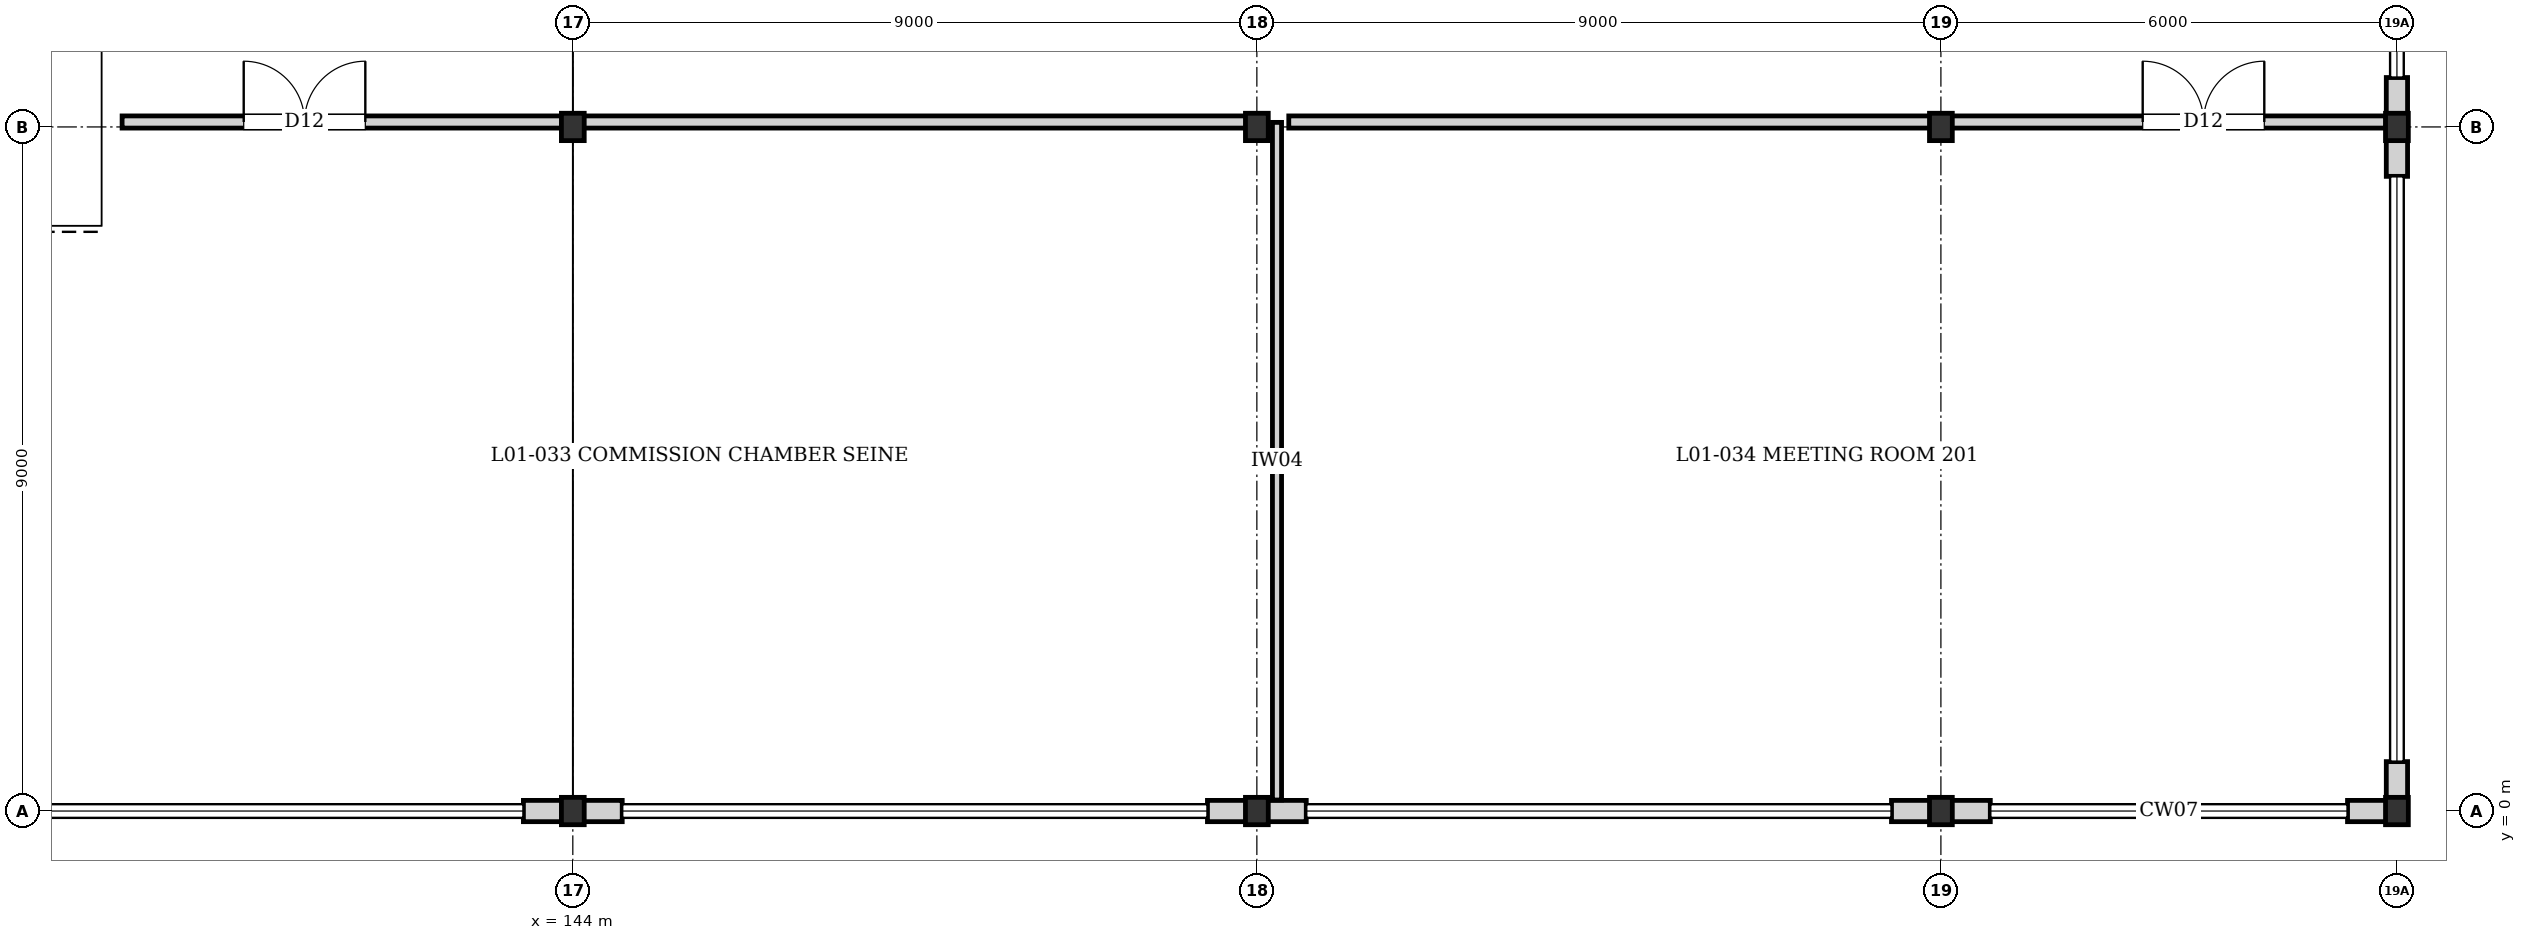
"""IFC4 building model, lengths in metres.
Left out: names, types, materials, properties, quantities, classifications, styles, units other than length and angle.
Written with IfcOpenShell. Run it as: python <this file> out.ifc"""

import sys

from ifc_helpers import new_model, si_unit, direction, frame, frame_2d, origin, origin_2d, place, context, subcontext, project, spatial, rectangle, i_section, extrude, element, fill, save


model = new_model("IFC4")
c1 = context("Model", 3, precision=1e-05, world=origin(), true_north=direction((0.0, 1.0)))
c2 = subcontext(c1, "Body", "Model", "MODEL_VIEW")
j1 = project(units=[si_unit("LENGTHUNIT", "METRE"), si_unit("PLANEANGLEUNIT", "RADIAN")], contexts=[c1])
p1 = place(None, origin())
s1 = spatial("IfcSite", under=j1, at=p1, CompositionType="ELEMENT")
p2 = place(p1, origin())
s2 = spatial("IfcBuilding", under=s1, at=p2, CompositionType="ELEMENT")
p3 = place(p2, frame((0.0, 0.0, 4.32)))
s3 = spatial("IfcBuildingStorey", under=s2, at=p3, CompositionType="ELEMENT", Elevation=4.32)
for number, where, z_axis, x_axis in (
    (1, (144.0, 0.0, 0.0), (0.0, 0.0, 1.0), (1.0, 0.0, 0.0)),
    (2, (144.0, 9.0, 0.0), (0.0, 0.0, 1.0), (1.0, 0.0, 0.0)),
    (3, (153.0, 0.0, 0.0), (0.0, 0.0, 1.0), (1.0, 0.0, 0.0)),
    (4, (153.0, 9.0, 0.0), (0.0, 0.0, 1.0), (1.0, 0.0, 0.0)),
    (5, (162.0, 0.0, 0.0), (0.0, 0.0, 1.0), (1.0, 0.0, 0.0)),
    (6, (162.0, 9.0, 0.0), (0.0, 0.0, 1.0), (1.0, 0.0, 0.0)),
    (7, (168.0, 0.0, 0.0), (0.0, 0.0, 1.0), (1.0, 0.0, 0.0)),
    (8, (168.0, 9.0, 0.0), (0.0, 0.0, 1.0), (1.0, 0.0, 0.0)),
):
    element("IfcColumn", number, at=place(p3, frame(where, z_axis=z_axis, x_axis=x_axis)), inside=s3, PredefinedType="COLUMN", context=c2, shape_type="SweptSolid", body=[
        extrude(i_section(OverallWidth=0.3, OverallDepth=0.36, WebThickness=0.012, FlangeThickness=0.022, at=origin_2d()), origin(), (0.0, 0.0, 1.0), 3.84),
    ])
p4 = place(p3, frame((168.0, 9.65, 0.0), z_axis=(0.0, 0.0, 1.0), x_axis=(0.0, -1.0, 0.0)))
e9 = element("IfcWall", 9, at=p4, inside=s3, PredefinedType="SOLIDWALL", context=c2, shape_type="SweptSolid", body=[
    extrude(rectangle(XDim=0.65, YDim=0.28, at=frame_2d((0.325, 0.0))), origin(), (0.0, 0.0, 1.0), 3.28),
])
p5 = place(p3, frame((168.0, 9.0, 0.0), z_axis=(0.0, 0.0, 1.0), x_axis=(0.0, -1.0, 0.0)))
e10 = element("IfcWall", 10, at=p5, inside=s3, PredefinedType="SOLIDWALL", context=c2, shape_type="SweptSolid", body=[
    extrude(rectangle(XDim=0.65, YDim=0.28, at=frame_2d((0.325, 0.0))), origin(), (0.0, 0.0, 1.0), 3.6),
])
p6 = place(p3, frame((168.0, 0.65, 0.0), z_axis=(0.0, 0.0, 1.0), x_axis=(0.0, -1.0, 0.0)))
e11 = element("IfcWall", 11, at=p6, inside=s3, PredefinedType="SOLIDWALL", context=c2, shape_type="SweptSolid", body=[
    extrude(rectangle(XDim=0.495, YDim=0.28, at=frame_2d((0.248, 0.0))), origin(), (0.0, 0.0, 1.0), 3.6),
])
for number, where, z_axis, x_axis in (
    (12, (168.0, 0.0, 0.0), (0.0, 0.0, 1.0), (-1.0, 0.0, 0.0)),
    (13, (162.65, 0.0, 0.0), (0.0, 0.0, 1.0), (-1.0, 0.0, 0.0)),
):
    element("IfcWall", number, at=place(p3, frame(where, z_axis=z_axis, x_axis=x_axis)), inside=s3, PredefinedType="SOLIDWALL", context=c2, shape_type="SweptSolid", body=[
        extrude(rectangle(XDim=0.65, YDim=0.28, at=frame_2d((0.325, 0.0))), origin(), (0.0, 0.0, 1.0), 3.28),
    ])
for number, where, z_axis, x_axis in (
    (14, (162.0, 0.0, 0.0), (0.0, 0.0, 1.0), (-1.0, 0.0, 0.0)),
    (15, (153.65, 0.0, 0.0), (0.0, 0.0, 1.0), (-1.0, 0.0, 0.0)),
):
    element("IfcWall", number, at=place(p3, frame(where, z_axis=z_axis, x_axis=x_axis)), inside=s3, PredefinedType="SOLIDWALL", context=c2, shape_type="SweptSolid", body=[
        extrude(rectangle(XDim=0.65, YDim=0.28, at=frame_2d((0.325, 0.0))), origin(), (0.0, 0.0, 1.0), 3.35),
    ])
for number, where, z_axis, x_axis in (
    (16, (153.0, 0.0, 0.0), (0.0, 0.0, 1.0), (-1.0, 0.0, 0.0)),
    (17, (144.65, 0.0, 0.0), (0.0, 0.0, 1.0), (-1.0, 0.0, 0.0)),
):
    element("IfcWall", number, at=place(p3, frame(where, z_axis=z_axis, x_axis=x_axis)), inside=s3, PredefinedType="SOLIDWALL", context=c2, shape_type="SweptSolid", body=[
        extrude(rectangle(XDim=0.65, YDim=0.28, at=frame_2d((0.325, 0.0))), origin(), (0.0, 0.0, 1.0), 3.18),
    ])
p7 = place(p3, frame((144.0, 0.0, 0.0), z_axis=(0.0, 0.0, 1.0), x_axis=(-1.0, 0.0, 0.0)))
e18 = element("IfcWall", 18, at=p7, inside=s3, PredefinedType="SOLIDWALL", context=c2, shape_type="SweptSolid", body=[
    extrude(rectangle(XDim=0.65, YDim=0.28, at=frame_2d((0.325, 0.0))), origin(), (0.0, 0.0, 1.0), 3.22),
])
p8 = place(p3, frame((153.265, 0.145, 0.0), z_axis=(0.0, 0.0, 1.0), x_axis=(0.0, 1.0, 0.0)))
e19 = element("IfcWall", 19, at=p8, inside=s3, PredefinedType="PARTITIONING", context=c2, shape_type="SweptSolid", body=[
    extrude(rectangle(XDim=8.915, YDim=0.12, at=frame_2d((4.458, 0.0))), origin(), (0.0, 0.0, 1.0), 3.6),
])
p9 = place(p3, frame((138.07, 9.065, 0.0), z_axis=(0.0, 0.0, 1.0), x_axis=(1.0, 0.0, 0.0)))
e20 = element("IfcWall", 20, at=p9, inside=s3, PredefinedType="PARTITIONING", context=c2, shape_type="SweptSolid", body=[
    extrude(rectangle(XDim=5.95, YDim=0.16, at=frame_2d((2.975, 0.0))), origin(), (0.0, 0.0, 1.0), 3.6),
])
p10 = place(p9, frame((1.6, 0.0, 0.0)))
e21 = element("IfcOpeningElement", 21, at=p10, cuts=e20, PredefinedType="OPENING", context=c2, shape_type="SweptSolid", body=[
    extrude(rectangle(XDim=1.6, YDim=2.3, at=frame_2d((0.8, 1.15))), frame((0.0, 0.09, 0.0), z_axis=(0.0, -1.0, 0.0), x_axis=(1.0, 0.0, 0.0)), (0.0, 0.0, 1.0), 0.18),
])
p11 = place(p3, frame((153.42, 9.065, 0.0), z_axis=(0.0, 0.0, 1.0), x_axis=(1.0, 0.0, 0.0)))
e22 = element("IfcWall", 22, at=p11, inside=s3, PredefinedType="PARTITIONING", context=c2, shape_type="SweptSolid", body=[
    extrude(rectangle(XDim=8.56, YDim=0.16, at=frame_2d((4.28, 0.0))), origin(), (0.0, 0.0, 1.0), 3.19),
])
p12 = place(p3, frame((144.02, 9.065, 0.0), z_axis=(0.0, 0.0, 1.0), x_axis=(1.0, 0.0, 0.0)))
e23 = element("IfcWall", 23, at=p12, inside=s3, PredefinedType="PARTITIONING", context=c2, shape_type="SweptSolid", body=[
    extrude(rectangle(XDim=9.09, YDim=0.16, at=frame_2d((4.545, 0.0))), origin(), (0.0, 0.0, 1.0), 3.25),
])
p13 = place(p3, frame((161.98, 9.065, 0.0), z_axis=(0.0, 0.0, 1.0), x_axis=(1.0, 0.0, 0.0)))
e24 = element("IfcWall", 24, at=p13, inside=s3, PredefinedType="PARTITIONING", context=c2, shape_type="SweptSolid", body=[
    extrude(rectangle(XDim=5.875, YDim=0.16, at=frame_2d((2.938, 0.0))), origin(), (0.0, 0.0, 1.0), 3.14),
])
p14 = place(p13, frame((2.675, 0.0, 0.0)))
e25 = element("IfcOpeningElement", 25, at=p14, cuts=e24, PredefinedType="OPENING", context=c2, shape_type="SweptSolid", body=[
    extrude(rectangle(XDim=1.6, YDim=2.3, at=frame_2d((0.8, 1.15))), frame((0.0, 0.09, 0.0), z_axis=(0.0, -1.0, 0.0), x_axis=(1.0, 0.0, 0.0)), (0.0, 0.0, 1.0), 0.18),
])
p15 = place(p10, origin())
e26 = element("IfcDoor", 26, at=p15, inside=s3, OperationType="DOUBLE_DOOR_SINGLE_SWING", PredefinedType="DOOR", context=c2, shape_type="SweptSolid", body=[
    extrude(rectangle(XDim=1.6, YDim=2.3, at=frame_2d((0.8, 1.15))), frame((0.0, 0.025, 0.0), z_axis=(0.0, -1.0, 0.0), x_axis=(1.0, 0.0, 0.0)), (0.0, 0.0, 1.0), 0.05),
])
fill(e21, e26)
p16 = place(p14, origin())
e27 = element("IfcDoor", 27, at=p16, inside=s3, OperationType="DOUBLE_DOOR_SINGLE_SWING", PredefinedType="DOOR", context=c2, shape_type="SweptSolid", body=[
    extrude(rectangle(XDim=1.6, YDim=2.3, at=frame_2d((0.8, 1.15))), frame((0.0, 0.025, 0.0), z_axis=(0.0, -1.0, 0.0), x_axis=(1.0, 0.0, 0.0)), (0.0, 0.0, 1.0), 0.05),
])
fill(e25, e27)
save(model, sys.argv[1])
